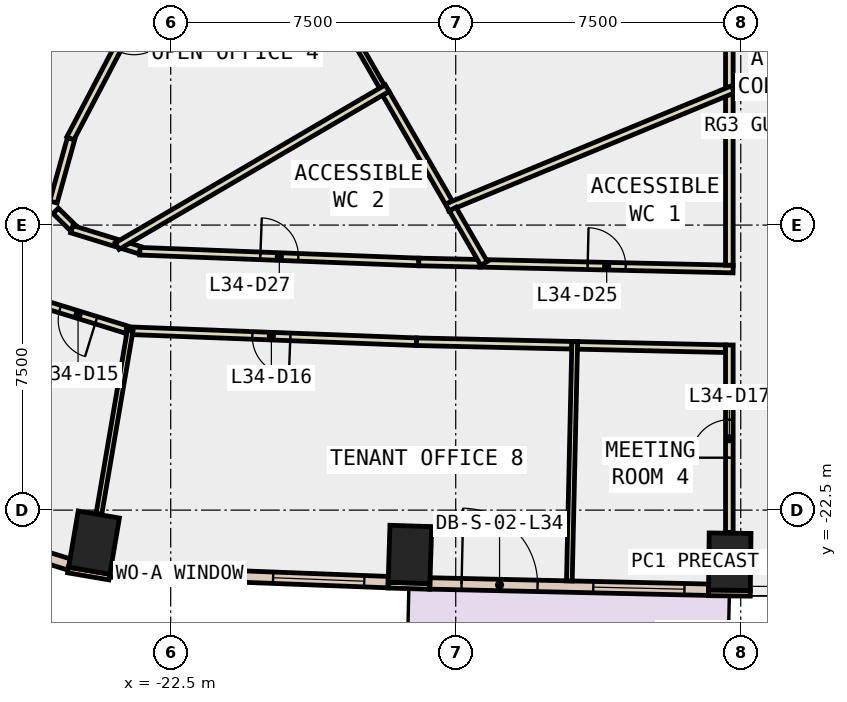
"""IFC4 building model, lengths in metres.
Left out: names, types, materials, properties, quantities, classifications, styles, units other than length and angle.
Written with IfcOpenShell. Run it as: python <this file> out.ifc"""

import sys

from ifc_helpers import new_model, si_unit, direction, frame, frame_2d, origin, origin_2d, place, context, subcontext, project, spatial, rectangle, extrude, element, fill, save


model = new_model("IFC4")
c1 = context("Model", 3, precision=1e-05, world=origin(), true_north=direction((0.0, 1.0)))
c2 = subcontext(c1, "Body", "Model", "MODEL_VIEW")
j1 = project(units=[si_unit("LENGTHUNIT", "METRE"), si_unit("PLANEANGLEUNIT", "RADIAN")], contexts=[c1])
p1 = place(None, origin())
s1 = spatial("IfcSite", under=j1, at=p1, CompositionType="ELEMENT")
p2 = place(p1, origin())
s2 = spatial("IfcBuilding", under=s1, at=p2, CompositionType="ELEMENT")
p3 = place(p2, frame((0.0, 0.0, 155.0)))
s3 = spatial("IfcBuildingStorey", under=s2, at=p3, CompositionType="ELEMENT", Elevation=155.0)
for number, where, z_axis, x_axis in (
    (1, (-24.518, -23.355, -0.4), (0.0, 0.0, 1.0), (-0.986, 0.168, 0.0)),
    (2, (-16.205, -23.666, -0.4), (0.0, 0.0, 1.0), (-0.999, 0.032, 0.0)),
    (3, (-7.789, -23.857, -0.4), (0.0, 0.0, 1.0), (-1.0, 0.012, 0.0)),
):
    element("IfcColumn", number, at=place(p3, frame(where, z_axis=z_axis, x_axis=x_axis)), inside=s3, PredefinedType="COLUMN", context=c2, shape_type="SweptSolid", body=[
        extrude(rectangle(XDim=1.1, YDim=1.5, at=origin_2d()), origin(), (0.0, 0.0, 1.0), 4.2),
    ])
p4 = place(p3, frame((-25.199, -24.076, 0.0), z_axis=(0.0, 0.0, 1.0), x_axis=(0.985763338892, -0.168138751323, 0.0)))
e4 = element("IfcWall", 4, at=p4, inside=s3, PredefinedType="STANDARD", context=c2, shape_type="SweptSolid", body=[
    extrude(rectangle(XDim=1.101, YDim=0.15, at=frame_2d((0.55, 0.0))), origin(), (0.0, 0.0, 1.0), 3.8),
])
p5 = place(p3, frame((-16.781, -24.474, 0.0), z_axis=(0.0, 0.0, 1.0), x_axis=(0.999523702549, -0.030860460829, 0.0)))
e5 = element("IfcWall", 5, at=p5, inside=s3, PredefinedType="STANDARD", context=c2, shape_type="SweptSolid", body=[
    extrude(rectangle(XDim=1.1, YDim=0.15, at=frame_2d((0.55, 0.0))), origin(), (0.0, 0.0, 1.0), 3.8),
])
p6 = place(p3, frame((-8.349, -24.676, 0.0), z_axis=(0.0, 0.0, 1.0), x_axis=(0.999940879068, -0.010873746799, 0.0)))
e6 = element("IfcWall", 6, at=p6, inside=s3, PredefinedType="STANDARD", context=c2, shape_type="SweptSolid", body=[
    extrude(rectangle(XDim=1.1, YDim=0.15, at=frame_2d((0.55, 0.0))), origin(), (0.0, 0.0, 1.0), 3.8),
])
p7 = place(p3, frame((-24.09, -24.114, 0.0), z_axis=(0.0, 0.0, 1.0), x_axis=(0.999262356942, -0.038402369711, 0.0)))
e7 = element("IfcWall", 7, at=p7, inside=s3, PredefinedType="STANDARD", context=c2, shape_type="SweptSolid", body=[
    extrude(rectangle(XDim=7.317, YDim=0.3, at=frame_2d((3.659, 0.0))), origin(), (0.0, 0.0, 1.0), 3.8),
])
p8 = place(p7, frame((0.629, 0.0, 0.9)))
e8 = element("IfcOpeningElement", 8, at=p8, cuts=e7, PredefinedType="OPENING", context=c2, shape_type="SweptSolid", body=[
    extrude(rectangle(XDim=2.4, YDim=2.6, at=frame_2d((1.2, 1.3))), frame((0.0, 0.16, 0.0), z_axis=(0.0, -1.0, 0.0), x_axis=(1.0, 0.0, 0.0)), (0.0, 0.0, 1.0), 0.32),
])
p9 = place(p7, frame((4.288, 0.0, 0.9)))
e9 = element("IfcOpeningElement", 9, at=p9, cuts=e7, PredefinedType="OPENING", context=c2, shape_type="SweptSolid", body=[
    extrude(rectangle(XDim=2.4, YDim=2.6, at=frame_2d((1.2, 1.3))), frame((0.0, 0.16, 0.0), z_axis=(0.0, -1.0, 0.0), x_axis=(1.0, 0.0, 0.0)), (0.0, 0.0, 1.0), 0.32),
])
p10 = place(p3, frame((-15.68, -24.429, 0.0), z_axis=(0.0, 0.0, 1.0), x_axis=(0.999743825009, -0.022633699594, 0.0)))
e10 = element("IfcWall", 10, at=p10, inside=s3, PredefinedType="STANDARD", context=c2, shape_type="SweptSolid", body=[
    extrude(rectangle(XDim=7.335, YDim=0.3, at=frame_2d((3.667, 0.0))), origin(), (0.0, 0.0, 1.0), 3.8),
])
p11 = place(p10, frame((0.834, 0.0, 0.0)))
e11 = element("IfcOpeningElement", 11, at=p11, cuts=e10, PredefinedType="OPENING", context=c2, shape_type="SweptSolid", body=[
    extrude(rectangle(XDim=2.0, YDim=2.4, at=frame_2d((1.0, 1.2))), frame((0.0, 0.16, 0.0), z_axis=(0.0, -1.0, 0.0), x_axis=(1.0, 0.0, 0.0)), (0.0, 0.0, 1.0), 0.32),
])
p12 = place(p10, frame((4.301, 0.0, 0.9)))
e12 = element("IfcOpeningElement", 12, at=p12, cuts=e10, PredefinedType="OPENING", context=c2, shape_type="SweptSolid", body=[
    extrude(rectangle(XDim=2.4, YDim=2.6, at=frame_2d((1.2, 1.3))), frame((0.0, 0.16, 0.0), z_axis=(0.0, -1.0, 0.0), x_axis=(1.0, 0.0, 0.0)), (0.0, 0.0, 1.0), 0.32),
])
p13 = place(p3, frame((-28.929, -22.77, 0.0), z_axis=(0.0, 0.0, 1.0), x_axis=(0.955473661147, -0.295076401723, 0.0)))
e13 = element("IfcWall", 13, at=p13, inside=s3, PredefinedType="STANDARD", context=c2, shape_type="SweptSolid", body=[
    extrude(rectangle(XDim=3.931, YDim=0.3, at=frame_2d((1.965, 0.0))), origin(), (0.0, 0.0, 1.0), 3.8),
])
p14 = place(p13, frame((1.266, 0.0, 0.9)))
e14 = element("IfcOpeningElement", 14, at=p14, cuts=e13, PredefinedType="OPENING", context=c2, shape_type="SweptSolid", body=[
    extrude(rectangle(XDim=1.4, YDim=2.6, at=frame_2d((0.7, 1.3))), frame((0.0, 0.16, 0.0), z_axis=(0.0, -1.0, 0.0), x_axis=(1.0, 0.0, 0.0)), (0.0, 0.0, 1.0), 0.32),
])
p15 = place(p3, frame((-14.356, -16.006, 0.0), z_axis=(0.0, 0.0, 1.0), x_axis=(0.999743177933, -0.022662263286, 0.0)))
e15 = element("IfcWall", 15, at=p15, inside=s3, PredefinedType="PARTITIONING", context=c2, shape_type="SweptSolid", body=[
    extrude(rectangle(XDim=6.658, YDim=0.2, at=frame_2d((3.329, 0.0))), origin(), (0.0, 0.0, 1.0), 3.8),
])
p16 = place(p15, frame((2.829, 0.0, 0.0)))
e16 = element("IfcOpeningElement", 16, at=p16, cuts=e15, PredefinedType="OPENING", context=c2, shape_type="SweptSolid", body=[
    extrude(rectangle(XDim=1.0, YDim=2.1, at=frame_2d((0.5, 1.05))), frame((0.0, 0.11, 0.0), z_axis=(0.0, -1.0, 0.0), x_axis=(1.0, 0.0, 0.0)), (0.0, 0.0, 1.0), 0.22),
])
p17 = place(p3, frame((-22.241, -7.198, 0.0), z_axis=(0.0, 0.0, 1.0), x_axis=(-0.465089990515, -0.885263407536, 0.0)))
e17 = element("IfcWall", 17, at=p17, inside=s3, PredefinedType="PARTITIONING", context=c2, shape_type="SweptSolid", body=[
    extrude(rectangle(XDim=6.24, YDim=0.2, at=frame_2d((3.12, 0.0))), origin(), (0.0, 0.0, 1.0), 3.8),
])
p18 = place(p17, frame((2.62, 0.0, 0.0)))
e18 = element("IfcOpeningElement", 18, at=p18, cuts=e17, PredefinedType="OPENING", context=c2, shape_type="SweptSolid", body=[
    extrude(rectangle(XDim=1.0, YDim=2.1, at=frame_2d((0.5, 1.05))), frame((0.0, 0.11, 0.0), z_axis=(0.0, -1.0, 0.0), x_axis=(1.0, 0.0, 0.0)), (0.0, 0.0, 1.0), 0.22),
])
p19 = place(p3, frame((-25.123, -12.73, 0.0), z_axis=(0.0, 0.0, 1.0), x_axis=(-0.268139825244, -0.963380005044, 0.0)))
e19 = element("IfcWall", 19, at=p19, inside=s3, PredefinedType="PARTITIONING", context=c2, shape_type="SweptSolid", body=[
    extrude(rectangle(XDim=1.726, YDim=0.2, at=frame_2d((0.863, 0.0))), origin(), (0.0, 0.0, 1.0), 3.8),
])
p20 = place(p3, frame((-25.526, -14.626, 0.0), z_axis=(0.0, 0.0, 1.0), x_axis=(0.711758647644, -0.702424108003, 0.0)))
e20 = element("IfcWall", 20, at=p20, inside=s3, PredefinedType="PARTITIONING", context=c2, shape_type="SweptSolid", body=[
    extrude(rectangle(XDim=0.628, YDim=0.2, at=frame_2d((0.314, 0.0))), origin(), (0.0, 0.0, 1.0), 3.8),
])
p21 = place(p3, frame((-25.103, -15.108, 0.0), z_axis=(0.0, 0.0, 1.0), x_axis=(0.955420813731, -0.295247470251, 0.0)))
e21 = element("IfcWall", 21, at=p21, inside=s3, PredefinedType="PARTITIONING", context=c2, shape_type="SweptSolid", body=[
    extrude(rectangle(XDim=1.24, YDim=0.2, at=frame_2d((0.62, 0.0))), origin(), (0.0, 0.0, 1.0), 3.8),
])
p22 = place(p3, frame((-23.727, -15.532, 0.0), z_axis=(0.0, 0.0, 1.0), x_axis=(0.955237350621, -0.295840504289, 0.0)))
e22 = element("IfcWall", 22, at=p22, inside=s3, PredefinedType="PARTITIONING", context=c2, shape_type="SweptSolid", body=[
    extrude(rectangle(XDim=0.44, YDim=0.2, at=frame_2d((0.22, 0.0))), origin(), (0.0, 0.0, 1.0), 3.8),
])
p23 = place(p3, frame((-23.311, -15.688, 0.0), z_axis=(0.0, 0.0, 1.0), x_axis=(0.999262695969, -0.038393546916, 0.0)))
e23 = element("IfcWall", 23, at=p23, inside=s3, PredefinedType="PARTITIONING", context=c2, shape_type="SweptSolid", body=[
    extrude(rectangle(XDim=7.344, YDim=0.2, at=frame_2d((3.672, 0.0))), origin(), (0.0, 0.0, 1.0), 3.8),
])
p24 = place(p23, frame((3.172, 0.0, 0.0)))
e24 = element("IfcOpeningElement", 24, at=p24, cuts=e23, PredefinedType="OPENING", context=c2, shape_type="SweptSolid", body=[
    extrude(rectangle(XDim=1.0, YDim=2.1, at=frame_2d((0.5, 1.05))), frame((0.0, 0.11, 0.0), z_axis=(0.0, -1.0, 0.0), x_axis=(1.0, 0.0, 0.0)), (0.0, 0.0, 1.0), 0.22),
])
p25 = place(p3, frame((-15.972, -15.97, 0.0), z_axis=(0.0, 0.0, 1.0), x_axis=(0.999750111735, -0.022354285623, 0.0)))
e25 = element("IfcWall", 25, at=p25, inside=s3, PredefinedType="PARTITIONING", context=c2, shape_type="SweptSolid", body=[
    extrude(rectangle(XDim=1.616, YDim=0.2, at=frame_2d((0.808, 0.0))), origin(), (0.0, 0.0, 1.0), 3.8),
])
p26 = place(p3, frame((-27.106, -11.944, 0.0), z_axis=(0.0, 0.0, 1.0), x_axis=(0.464985599417, 0.885318243534, 0.0)))
e26 = element("IfcWall", 26, at=p26, inside=s3, PredefinedType="PARTITIONING", context=c2, shape_type="SweptSolid", body=[
    extrude(rectangle(XDim=6.402, YDim=0.2, at=frame_2d((3.201, 0.0))), origin(), (0.0, 0.0, 1.0), 3.8),
])
p27 = place(p26, frame((2.776, 0.0, 0.0)))
e27 = element("IfcOpeningElement", 27, at=p27, cuts=e26, PredefinedType="OPENING", context=c2, shape_type="SweptSolid", body=[
    extrude(rectangle(XDim=1.0, YDim=2.1, at=frame_2d((0.5, 1.05))), frame((0.0, 0.11, 0.0), z_axis=(0.0, -1.0, 0.0), x_axis=(1.0, 0.0, 0.0)), (0.0, 0.0, 1.0), 0.22),
])
p28 = place(p3, frame((-23.663, -17.75, 0.0), z_axis=(0.0, 0.0, 1.0), x_axis=(-0.955509582123, 0.294960062501, 0.0)))
e28 = element("IfcWall", 28, at=p28, inside=s3, PredefinedType="PARTITIONING", context=c2, shape_type="SweptSolid", body=[
    extrude(rectangle(XDim=2.668, YDim=0.2, at=frame_2d((1.334, 0.0))), origin(), (0.0, 0.0, 1.0), 3.8),
])
p29 = place(p28, frame((0.834, 0.0, 0.0)))
e29 = element("IfcOpeningElement", 29, at=p29, cuts=e28, PredefinedType="OPENING", context=c2, shape_type="SweptSolid", body=[
    extrude(rectangle(XDim=1.0, YDim=2.1, at=frame_2d((0.5, 1.05))), frame((0.0, 0.11, 0.0), z_axis=(0.0, -1.0, 0.0), x_axis=(1.0, 0.0, 0.0)), (0.0, 0.0, 1.0), 0.22),
])
p30 = place(p3, frame((-11.945, -18.162, 0.0), z_axis=(0.0, 0.0, 1.0), x_axis=(-0.999741589065, 0.022732247877, 0.0)))
e30 = element("IfcWall", 30, at=p30, inside=s3, PredefinedType="PARTITIONING", context=c2, shape_type="SweptSolid", body=[
    extrude(rectangle(XDim=4.092, YDim=0.2, at=frame_2d((2.046, 0.0))), origin(), (0.0, 0.0, 1.0), 3.8),
])
p31 = place(p3, frame((-16.036, -18.069, 0.0), z_axis=(0.0, 0.0, 1.0), x_axis=(-0.999262637786, 0.038395061202, 0.0)))
e31 = element("IfcWall", 31, at=p31, inside=s3, PredefinedType="PARTITIONING", context=c2, shape_type="SweptSolid", body=[
    extrude(rectangle(XDim=7.637, YDim=0.2, at=frame_2d((3.818, 0.0))), origin(), (0.0, 0.0, 1.0), 3.8),
])
p32 = place(p31, frame((3.318, 0.0, 0.0)))
e32 = element("IfcOpeningElement", 32, at=p32, cuts=e31, PredefinedType="OPENING", context=c2, shape_type="SweptSolid", body=[
    extrude(rectangle(XDim=1.0, YDim=2.1, at=frame_2d((0.5, 1.05))), frame((0.0, 0.11, 0.0), z_axis=(0.0, -1.0, 0.0), x_axis=(1.0, 0.0, 0.0)), (0.0, 0.0, 1.0), 0.22),
])
p33 = place(p3, frame((-7.9, -18.253, 0.0), z_axis=(0.0, 0.0, 1.0), x_axis=(-0.999745510411, 0.022559131487, 0.0)))
e33 = element("IfcWall", 33, at=p33, inside=s3, PredefinedType="PARTITIONING", context=c2, shape_type="SweptSolid", body=[
    extrude(rectangle(XDim=3.896, YDim=0.2, at=frame_2d((1.948, 0.0))), origin(), (0.0, 0.0, 1.0), 3.8),
])
p34 = place(p3, frame((-7.8, -11.368, 0.0), z_axis=(0.0, 0.0, 1.0), x_axis=(0.0, 1.0, 0.0)))
e34 = element("IfcWall", 34, at=p34, inside=s3, PredefinedType="PARTITIONING", context=c2, shape_type="SweptSolid", body=[
    extrude(rectangle(XDim=1.969, YDim=0.2, at=frame_2d((0.984, 0.0))), origin(), (0.0, 0.0, 1.0), 3.8),
])
p35 = place(p3, frame((-7.8, -16.055, 0.0), z_axis=(0.0, 0.0, 1.0), x_axis=(0.0, 1.0, 0.0)))
e35 = element("IfcWall", 35, at=p35, inside=s3, PredefinedType="PARTITIONING", context=c2, shape_type="SweptSolid", body=[
    extrude(rectangle(XDim=4.487, YDim=0.2, at=frame_2d((2.243, 0.0))), origin(), (0.0, 0.0, 1.0), 3.8),
])
p36 = place(p3, frame((-7.8, -23.087, 0.0), z_axis=(0.0, 0.0, 1.0), x_axis=(0.0, 1.0, 0.0)))
e36 = element("IfcWall", 36, at=p36, inside=s3, PredefinedType="PARTITIONING", context=c2, shape_type="SweptSolid", body=[
    extrude(rectangle(XDim=4.932, YDim=0.2, at=frame_2d((2.466, 0.0))), origin(), (0.0, 0.0, 1.0), 3.8),
])
p37 = place(p36, frame((1.966, 0.0, 0.0)))
e37 = element("IfcOpeningElement", 37, at=p37, cuts=e36, PredefinedType="OPENING", context=c2, shape_type="SweptSolid", body=[
    extrude(rectangle(XDim=1.0, YDim=2.1, at=frame_2d((0.5, 1.05))), frame((0.0, 0.11, 0.0), z_axis=(0.0, -1.0, 0.0), x_axis=(1.0, 0.0, 0.0)), (0.0, 0.0, 1.0), 0.22),
])
p38 = place(p3, frame((-7.708, -11.43, 0.0), z_axis=(0.0, 0.0, 1.0), x_axis=(-0.924285151797, -0.381702709144, 0.0)))
e38 = element("IfcWall", 38, at=p38, inside=s3, PredefinedType="PARTITIONING", context=c2, shape_type="SweptSolid", body=[
    extrude(rectangle(XDim=8.129, YDim=0.2, at=frame_2d((4.065, 0.0))), origin(), (0.0, 0.0, 1.0), 3.8),
])
p39 = place(p3, frame((-16.939, -11.36, 0.0), z_axis=(0.0, 0.0, 1.0), x_axis=(-0.500053473428, 0.865994528685, 0.0)))
e39 = element("IfcWall", 39, at=p39, inside=s3, PredefinedType="PARTITIONING", context=c2, shape_type="SweptSolid", body=[
    extrude(rectangle(XDim=7.895, YDim=0.15, at=frame_2d((3.948, 0.0))), origin(), (0.0, 0.0, 1.0), 3.8),
])
p40 = place(p3, frame((-15.18, -14.408, 0.0), z_axis=(0.0, 0.0, 1.0), x_axis=(-0.499968694491, 0.866043477274, 0.0)))
e40 = element("IfcWall", 40, at=p40, inside=s3, PredefinedType="PARTITIONING", context=c2, shape_type="SweptSolid", body=[
    extrude(rectangle(XDim=3.319, YDim=0.2, at=frame_2d((1.659, 0.0))), origin(), (0.0, 0.0, 1.0), 3.8),
])
p41 = place(p3, frame((-14.256, -16.009, 0.0), z_axis=(0.0, 0.0, 1.0), x_axis=(-0.499786551025, 0.86614860354, 0.0)))
e41 = element("IfcWall", 41, at=p41, inside=s3, PredefinedType="PARTITIONING", context=c2, shape_type="SweptSolid", body=[
    extrude(rectangle(XDim=1.649, YDim=0.2, at=frame_2d((0.824, 0.0))), origin(), (0.0, 0.0, 1.0), 3.8),
])
p42 = place(p3, frame((-16.803, -11.397, 0.0), z_axis=(0.0, 0.0, 1.0), x_axis=(-0.863203941699, -0.504855380318, 0.0)))
e42 = element("IfcWall", 42, at=p42, inside=s3, PredefinedType="PARTITIONING", context=c2, shape_type="SweptSolid", body=[
    extrude(rectangle(XDim=8.232, YDim=0.2, at=frame_2d((4.116, 0.0))), origin(), (0.0, 0.0, 1.0), 3.8),
])
p43 = place(p3, frame((-23.567, -17.779, 0.0), z_axis=(0.0, 0.0, 1.0), x_axis=(-0.168027663896, -0.985782280306, 0.0)))
e43 = element("IfcWall", 43, at=p43, inside=s3, PredefinedType="PARTITIONING", context=c2, shape_type="SweptSolid", body=[
    extrude(rectangle(XDim=4.886, YDim=0.15, at=frame_2d((2.443, 0.0))), origin(), (0.0, 0.0, 1.0), 3.8),
])
p44 = place(p3, frame((-11.868, -18.063, 0.0), z_axis=(0.0, 0.0, 1.0), x_axis=(-0.022551528502, -0.999745681942, 0.0)))
e44 = element("IfcWall", 44, at=p44, inside=s3, PredefinedType="PARTITIONING", context=c2, shape_type="SweptSolid", body=[
    extrude(rectangle(XDim=6.301, YDim=0.15, at=frame_2d((3.15, 0.0))), origin(), (0.0, 0.0, 1.0), 3.8),
])
p45 = place(p8, origin())
e45 = element("IfcWindow", 45, at=p45, inside=s3, PartitioningType="SINGLE_PANEL", PredefinedType="WINDOW", context=c2, shape_type="SweptSolid", body=[
    extrude(rectangle(XDim=2.4, YDim=2.6, at=frame_2d((1.2, 1.3))), frame((0.0, 0.03, 0.0), z_axis=(0.0, -1.0, 0.0), x_axis=(1.0, 0.0, 0.0)), (0.0, 0.0, 1.0), 0.06),
])
fill(e8, e45)
p46 = place(p9, origin())
e46 = element("IfcWindow", 46, at=p46, inside=s3, PartitioningType="SINGLE_PANEL", PredefinedType="WINDOW", context=c2, shape_type="SweptSolid", body=[
    extrude(rectangle(XDim=2.4, YDim=2.6, at=frame_2d((1.2, 1.3))), frame((0.0, 0.03, 0.0), z_axis=(0.0, -1.0, 0.0), x_axis=(1.0, 0.0, 0.0)), (0.0, 0.0, 1.0), 0.06),
])
fill(e9, e46)
p47 = place(p11, origin())
e47 = element("IfcDoor", 47, at=p47, inside=s3, OperationType="SLIDING_TO_LEFT", PredefinedType="DOOR", context=c2, shape_type="SweptSolid", body=[
    extrude(rectangle(XDim=2.0, YDim=2.4, at=frame_2d((1.0, 1.2))), frame((0.0, 0.025, 0.0), z_axis=(0.0, -1.0, 0.0), x_axis=(1.0, 0.0, 0.0)), (0.0, 0.0, 1.0), 0.05),
])
fill(e11, e47)
p48 = place(p12, origin())
e48 = element("IfcWindow", 48, at=p48, inside=s3, PartitioningType="SINGLE_PANEL", PredefinedType="WINDOW", context=c2, shape_type="SweptSolid", body=[
    extrude(rectangle(XDim=2.4, YDim=2.6, at=frame_2d((1.2, 1.3))), frame((0.0, 0.03, 0.0), z_axis=(0.0, -1.0, 0.0), x_axis=(1.0, 0.0, 0.0)), (0.0, 0.0, 1.0), 0.06),
])
fill(e12, e48)
p49 = place(p29, origin())
e49 = element("IfcDoor", 49, at=p49, inside=s3, OperationType="SINGLE_SWING_LEFT", PredefinedType="DOOR", context=c2, shape_type="SweptSolid", body=[
    extrude(rectangle(XDim=1.0, YDim=2.1, at=frame_2d((0.5, 1.05))), frame((0.0, 0.025, 0.0), z_axis=(0.0, -1.0, 0.0), x_axis=(1.0, 0.0, 0.0)), (0.0, 0.0, 1.0), 0.05),
])
fill(e29, e49)
p50 = place(p32, origin())
e50 = element("IfcDoor", 50, at=p50, inside=s3, OperationType="SINGLE_SWING_RIGHT", PredefinedType="DOOR", context=c2, shape_type="SweptSolid", body=[
    extrude(rectangle(XDim=1.0, YDim=2.1, at=frame_2d((0.5, 1.05))), frame((0.0, 0.025, 0.0), z_axis=(0.0, -1.0, 0.0), x_axis=(1.0, 0.0, 0.0)), (0.0, 0.0, 1.0), 0.05),
])
fill(e32, e50)
p51 = place(p37, origin())
e51 = element("IfcDoor", 51, at=p51, inside=s3, OperationType="SINGLE_SWING_LEFT", PredefinedType="DOOR", context=c2, shape_type="SweptSolid", body=[
    extrude(rectangle(XDim=1.0, YDim=2.1, at=frame_2d((0.5, 1.05))), frame((0.0, 0.025, 0.0), z_axis=(0.0, -1.0, 0.0), x_axis=(1.0, 0.0, 0.0)), (0.0, 0.0, 1.0), 0.05),
])
fill(e37, e51)
p52 = place(p16, origin())
e52 = element("IfcDoor", 52, at=p52, inside=s3, OperationType="SINGLE_SWING_LEFT", PredefinedType="DOOR", context=c2, shape_type="SweptSolid", body=[
    extrude(rectangle(XDim=1.0, YDim=2.1, at=frame_2d((0.5, 1.05))), frame((0.0, 0.025, 0.0), z_axis=(0.0, -1.0, 0.0), x_axis=(1.0, 0.0, 0.0)), (0.0, 0.0, 1.0), 0.05),
])
fill(e16, e52)
p53 = place(p24, origin())
e53 = element("IfcDoor", 53, at=p53, inside=s3, OperationType="SINGLE_SWING_RIGHT", PredefinedType="DOOR", context=c2, shape_type="SweptSolid", body=[
    extrude(rectangle(XDim=1.0, YDim=2.1, at=frame_2d((0.5, 1.05))), frame((0.0, 0.025, 0.0), z_axis=(0.0, -1.0, 0.0), x_axis=(1.0, 0.0, 0.0)), (0.0, 0.0, 1.0), 0.05),
])
fill(e24, e53)
save(model, sys.argv[1])
